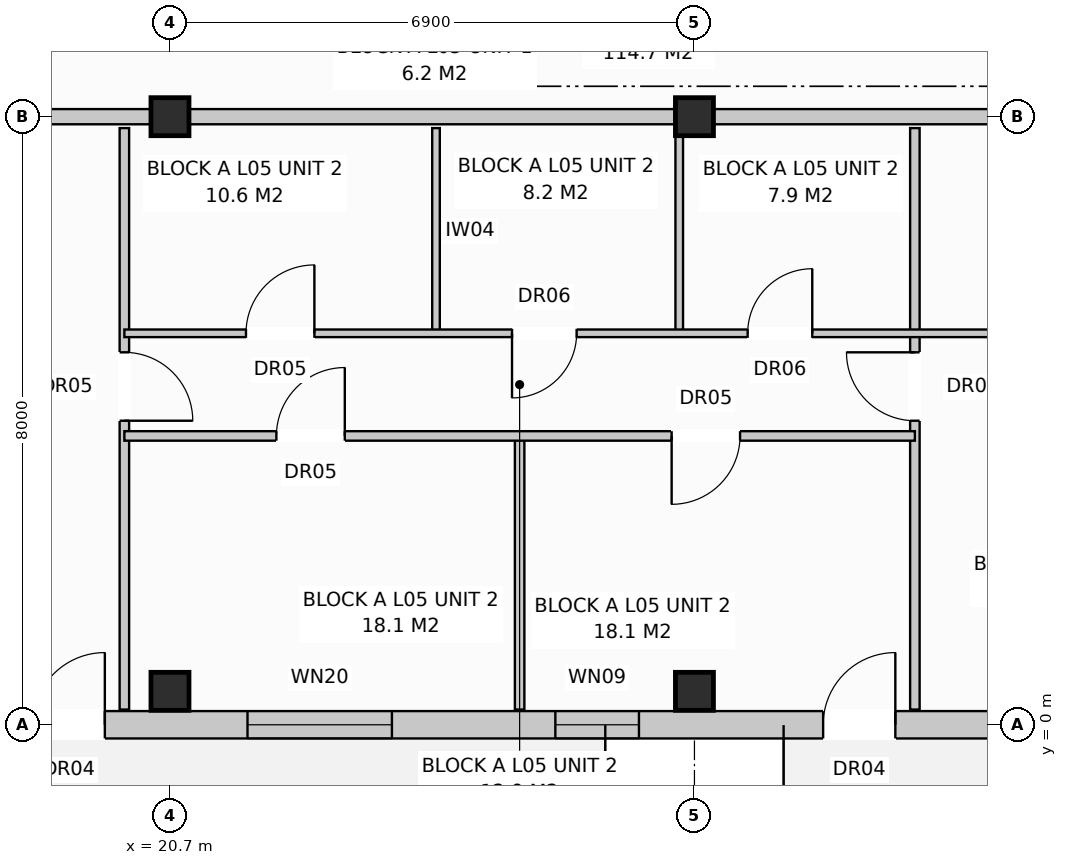
"""IFC4 building model, lengths in metres.
Left out: names, types, materials, properties, quantities, classifications, styles, units other than length and angle.
Written with IfcOpenShell. Run it as: python <this file> out.ifc"""

import sys

from ifc_helpers import new_model, si_unit, direction, frame, frame_2d, origin, origin_with_axes, origin_2d, place, context, subcontext, project, spatial, rectangle, extrude, element, fill, save


model = new_model("IFC4")
c1 = context("Model", 3, precision=1e-05, world=origin(), true_north=direction((0.0, 1.0)))
c2 = subcontext(c1, "Body", "Model", "MODEL_VIEW")
j1 = project(units=[si_unit("LENGTHUNIT", "METRE"), si_unit("PLANEANGLEUNIT", "RADIAN")], contexts=[c1])
p1 = place(None, origin())
s1 = spatial("IfcSite", under=j1, at=p1, CompositionType="ELEMENT")
p2 = place(p1, origin())
s2 = spatial("IfcBuilding", under=s1, at=p2, CompositionType="ELEMENT")
p3 = place(p2, frame((0.0, 0.0, 17.6)))
s3 = spatial("IfcBuildingStorey", under=s2, at=p3, CompositionType="ELEMENT", Elevation=17.6)
for number, where, z_axis, x_axis in (
    (1, (20.7, 0.44, 0.0), (0.0, 0.0, 1.0), (1.0, 0.0, 0.0)),
    (2, (20.7, 8.0, 0.0), (0.0, 0.0, 1.0), (1.0, 0.0, 0.0)),
    (3, (27.6, 0.44, 0.0), (0.0, 0.0, 1.0), (1.0, 0.0, 0.0)),
    (4, (27.6, 8.0, 0.0), (0.0, 0.0, 1.0), (1.0, 0.0, 0.0)),
):
    element("IfcColumn", number, at=place(p3, frame(where, z_axis=z_axis, x_axis=x_axis)), inside=s3, PredefinedType="COLUMN", context=c2, shape_type="SweptSolid", body=[
        extrude(rectangle(XDim=0.5, YDim=0.5, at=origin_2d()), origin(), (0.0, 0.0, 1.0), 3.2),
    ])
p4 = place(p3, frame((0.17, 0.0, 0.0), z_axis=(0.0, 0.0, 1.0), x_axis=(1.0, 0.0, 0.0)))
e5 = element("IfcWall", 5, at=p4, inside=s3, PredefinedType="STANDARD", context=c2, shape_type="SweptSolid", body=[
    extrude(rectangle(XDim=54.86, YDim=0.36, at=frame_2d((27.43, 0.0))), origin(), (0.0, 0.0, 1.0), 2.95),
])
p5 = place(p4, frame((3.823, 0.0, 0.0)))
e6 = element("IfcOpeningElement", 6, at=p5, cuts=e5, PredefinedType="OPENING", context=c2, shape_type="SweptSolid", body=[
    extrude(rectangle(XDim=0.95, YDim=2.1, at=frame_2d((0.475, 1.05))), frame((0.0, 0.192, 0.0), z_axis=(0.0, -1.0, 0.0), x_axis=(1.0, 0.0, 0.0)), (0.0, 0.0, 1.0), 0.384),
])
p6 = place(p4, frame((18.723, 0.0, 0.0)))
e7 = element("IfcOpeningElement", 7, at=p6, cuts=e5, PredefinedType="OPENING", context=c2, shape_type="SweptSolid", body=[
    extrude(rectangle(XDim=0.95, YDim=2.1, at=frame_2d((0.475, 1.05))), frame((0.0, 0.192, 0.0), z_axis=(0.0, -1.0, 0.0), x_axis=(1.0, 0.0, 0.0)), (0.0, 0.0, 1.0), 0.384),
])
p7 = place(p4, frame((29.123, 0.0, 0.0)))
e8 = element("IfcOpeningElement", 8, at=p7, cuts=e5, PredefinedType="OPENING", context=c2, shape_type="SweptSolid", body=[
    extrude(rectangle(XDim=0.95, YDim=2.1, at=frame_2d((0.475, 1.05))), frame((0.0, 0.192, 0.0), z_axis=(0.0, -1.0, 0.0), x_axis=(1.0, 0.0, 0.0)), (0.0, 0.0, 1.0), 0.384),
])
p8 = place(p4, frame((46.5, 0.0, 0.0)))
e9 = element("IfcOpeningElement", 9, at=p8, cuts=e5, PredefinedType="OPENING", context=c2, shape_type="SweptSolid", body=[
    extrude(rectangle(XDim=0.95, YDim=2.1, at=frame_2d((0.475, 1.05))), frame((0.0, 0.192, 0.0), z_axis=(0.0, -1.0, 0.0), x_axis=(1.0, 0.0, 0.0)), (0.0, 0.0, 1.0), 0.384),
])
p9 = place(p4, frame((1.6, 0.0, 0.8)))
e10 = element("IfcOpeningElement", 10, at=p9, cuts=e5, PredefinedType="OPENING", context=c2, shape_type="SweptSolid", body=[
    extrude(rectangle(XDim=1.8, YDim=1.7, at=frame_2d((0.9, 0.85))), frame((0.0, 0.192, 0.0), z_axis=(0.0, -1.0, 0.0), x_axis=(1.0, 0.0, 0.0)), (0.0, 0.0, 1.0), 0.384),
])
p10 = place(p4, frame((7.232, 0.0, 0.72)))
e11 = element("IfcOpeningElement", 11, at=p10, cuts=e5, PredefinedType="OPENING", context=c2, shape_type="SweptSolid", body=[
    extrude(rectangle(XDim=1.9, YDim=1.85, at=frame_2d((0.95, 0.925))), frame((0.0, 0.192, 0.0), z_axis=(0.0, -1.0, 0.0), x_axis=(1.0, 0.0, 0.0)), (0.0, 0.0, 1.0), 0.384),
])
p11 = place(p4, frame((10.425, 0.0, 0.8)))
e12 = element("IfcOpeningElement", 12, at=p11, cuts=e5, PredefinedType="OPENING", context=c2, shape_type="SweptSolid", body=[
    extrude(rectangle(XDim=1.95, YDim=1.65, at=frame_2d((0.975, 0.825))), frame((0.0, 0.192, 0.0), z_axis=(0.0, -1.0, 0.0), x_axis=(1.0, 0.0, 0.0)), (0.0, 0.0, 1.0), 0.384),
])
p12 = place(p4, frame((15.9, 0.0, 0.8)))
e13 = element("IfcOpeningElement", 13, at=p12, cuts=e5, PredefinedType="OPENING", context=c2, shape_type="SweptSolid", body=[
    extrude(rectangle(XDim=1.8, YDim=1.7, at=frame_2d((0.9, 0.85))), frame((0.0, 0.192, 0.0), z_axis=(0.0, -1.0, 0.0), x_axis=(1.0, 0.0, 0.0)), (0.0, 0.0, 1.0), 0.384),
])
p13 = place(p4, frame((21.55, 0.0, 0.72)))
e14 = element("IfcOpeningElement", 14, at=p13, cuts=e5, PredefinedType="OPENING", context=c2, shape_type="SweptSolid", body=[
    extrude(rectangle(XDim=1.9, YDim=1.85, at=frame_2d((0.95, 0.925))), frame((0.0, 0.192, 0.0), z_axis=(0.0, -1.0, 0.0), x_axis=(1.0, 0.0, 0.0)), (0.0, 0.0, 1.0), 0.384),
])
p14 = place(p4, frame((25.6, 0.0, 0.72)))
e15 = element("IfcOpeningElement", 15, at=p14, cuts=e5, PredefinedType="OPENING", context=c2, shape_type="SweptSolid", body=[
    extrude(rectangle(XDim=1.1, YDim=1.5, at=frame_2d((0.55, 0.75))), frame((0.0, 0.192, 0.0), z_axis=(0.0, -1.0, 0.0), x_axis=(1.0, 0.0, 0.0)), (0.0, 0.0, 1.0), 0.384),
])
p15 = place(p4, frame((31.4, 0.0, 0.8)))
e16 = element("IfcOpeningElement", 16, at=p15, cuts=e5, PredefinedType="OPENING", context=c2, shape_type="SweptSolid", body=[
    extrude(rectangle(XDim=1.8, YDim=1.7, at=frame_2d((0.9, 0.85))), frame((0.0, 0.192, 0.0), z_axis=(0.0, -1.0, 0.0), x_axis=(1.0, 0.0, 0.0)), (0.0, 0.0, 1.0), 0.384),
])
p16 = place(p4, frame((35.55, 0.0, 0.72)))
e17 = element("IfcOpeningElement", 17, at=p16, cuts=e5, PredefinedType="OPENING", context=c2, shape_type="SweptSolid", body=[
    extrude(rectangle(XDim=1.9, YDim=1.85, at=frame_2d((0.95, 0.925))), frame((0.0, 0.192, 0.0), z_axis=(0.0, -1.0, 0.0), x_axis=(1.0, 0.0, 0.0)), (0.0, 0.0, 1.0), 0.384),
])
p17 = place(p4, frame((39.25, 0.0, 0.72)))
e18 = element("IfcOpeningElement", 18, at=p17, cuts=e5, PredefinedType="OPENING", context=c2, shape_type="SweptSolid", body=[
    extrude(rectangle(XDim=1.1, YDim=1.5, at=frame_2d((0.55, 0.75))), frame((0.0, 0.192, 0.0), z_axis=(0.0, -1.0, 0.0), x_axis=(1.0, 0.0, 0.0)), (0.0, 0.0, 1.0), 0.384),
])
p18 = place(p4, frame((44.4, 0.0, 0.8)))
e19 = element("IfcOpeningElement", 19, at=p18, cuts=e5, PredefinedType="OPENING", context=c2, shape_type="SweptSolid", body=[
    extrude(rectangle(XDim=1.8, YDim=1.7, at=frame_2d((0.9, 0.85))), frame((0.0, 0.192, 0.0), z_axis=(0.0, -1.0, 0.0), x_axis=(1.0, 0.0, 0.0)), (0.0, 0.0, 1.0), 0.384),
])
p19 = place(p4, frame((49.15, 0.0, 0.72)))
e20 = element("IfcOpeningElement", 20, at=p19, cuts=e5, PredefinedType="OPENING", context=c2, shape_type="SweptSolid", body=[
    extrude(rectangle(XDim=1.9, YDim=1.85, at=frame_2d((0.95, 0.925))), frame((0.0, 0.192, 0.0), z_axis=(0.0, -1.0, 0.0), x_axis=(1.0, 0.0, 0.0)), (0.0, 0.0, 1.0), 0.384),
])
p20 = place(p4, frame((52.95, 0.0, 0.72)))
e21 = element("IfcOpeningElement", 21, at=p20, cuts=e5, PredefinedType="OPENING", context=c2, shape_type="SweptSolid", body=[
    extrude(rectangle(XDim=1.1, YDim=1.5, at=frame_2d((0.55, 0.75))), frame((0.0, 0.192, 0.0), z_axis=(0.0, -1.0, 0.0), x_axis=(1.0, 0.0, 0.0)), (0.0, 0.0, 1.0), 0.384),
])
p21 = place(p3, frame((13.8, 8.0, 0.0), z_axis=(0.0, 0.0, 1.0), x_axis=(1.0, 0.0, 0.0)))
e22 = element("IfcWall", 22, at=p21, inside=s3, PredefinedType="PARTITIONING", context=c2, shape_type="SweptSolid", body=[
    extrude(rectangle(XDim=20.7, YDim=0.2, at=frame_2d((10.35, 0.0))), origin(), (0.0, 0.0, 1.0), 2.39),
])
p22 = place(p21, frame((2.4, 0.0, 0.0)))
e23 = element("IfcOpeningElement", 23, at=p22, cuts=e22, PredefinedType="OPENING", context=c2, shape_type="SweptSolid", body=[
    extrude(rectangle(XDim=0.95, YDim=2.15, at=frame_2d((0.475, 1.075))), frame((0.0, 0.112, 0.0), z_axis=(0.0, -1.0, 0.0), x_axis=(1.0, 0.0, 0.0)), (0.0, 0.0, 1.0), 0.224),
])
p23 = place(p3, frame((20.1, 7.85, 0.0), z_axis=(0.0, 0.0, 1.0), x_axis=(0.0, -1.0, 0.0)))
e24 = element("IfcWall", 24, at=p23, inside=s3, PredefinedType="PARTITIONING", context=c2, shape_type="SweptSolid", body=[
    extrude(rectangle(XDim=7.65, YDim=0.125, at=frame_2d((3.825, 0.0))), origin(), (0.0, 0.0, 1.0), 2.95),
])
p24 = place(p23, frame((2.95, 0.0, 0.0)))
e25 = element("IfcOpeningElement", 25, at=p24, cuts=e24, PredefinedType="OPENING", context=c2, shape_type="SweptSolid", body=[
    extrude(rectangle(XDim=0.9, YDim=2.1, at=frame_2d((0.45, 1.05))), frame((0.0, 0.074, 0.0), z_axis=(0.0, -1.0, 0.0), x_axis=(1.0, 0.0, 0.0)), (0.0, 0.0, 1.0), 0.149),
])
for number, where, z_axis, x_axis in (
    (26, (24.2, 7.85, 0.0), (0.0, 0.0, 1.0), (0.0, -1.0, 0.0)),
    (27, (27.4, 7.85, 0.0), (0.0, 0.0, 1.0), (0.0, -1.0, 0.0)),
):
    element("IfcWall", number, at=place(p3, frame(where, z_axis=z_axis, x_axis=x_axis)), inside=s3, PredefinedType="PARTITIONING", context=c2, shape_type="SweptSolid", body=[
        extrude(rectangle(XDim=2.7, YDim=0.1, at=frame_2d((1.35, 0.0))), origin(), (0.0, 0.0, 1.0), 2.95),
    ])
p25 = place(p3, frame((25.3, 3.8, 0.0), z_axis=(0.0, 0.0, 1.0), x_axis=(0.0, -1.0, 0.0)))
e28 = element("IfcWall", 28, at=p25, inside=s3, PredefinedType="PARTITIONING", context=c2, shape_type="SweptSolid", body=[
    extrude(rectangle(XDim=3.6, YDim=0.125, at=frame_2d((1.8, 0.0))), origin(), (0.0, 0.0, 1.0), 2.95),
])
p26 = place(p3, frame((30.5, 7.85, 0.0), z_axis=(0.0, 0.0, 1.0), x_axis=(0.0, -1.0, 0.0)))
e29 = element("IfcWall", 29, at=p26, inside=s3, PredefinedType="PARTITIONING", context=c2, shape_type="SweptSolid", body=[
    extrude(rectangle(XDim=7.65, YDim=0.125, at=frame_2d((3.825, 0.0))), origin(), (0.0, 0.0, 1.0), 2.95),
])
p27 = place(p26, frame((2.95, 0.0, 0.0)))
e30 = element("IfcOpeningElement", 30, at=p27, cuts=e29, PredefinedType="OPENING", context=c2, shape_type="SweptSolid", body=[
    extrude(rectangle(XDim=0.9, YDim=2.1, at=frame_2d((0.45, 1.05))), frame((0.0, 0.074, 0.0), z_axis=(0.0, -1.0, 0.0), x_axis=(1.0, 0.0, 0.0)), (0.0, 0.0, 1.0), 0.149),
])
p28 = place(p3, frame((20.1, 5.15, 0.0), z_axis=(0.0, 0.0, 1.0), x_axis=(1.0, 0.0, 0.0)))
e31 = element("IfcWall", 31, at=p28, inside=s3, PredefinedType="PARTITIONING", context=c2, shape_type="SweptSolid", body=[
    extrude(rectangle(XDim=14.3, YDim=0.1, at=frame_2d((7.15, 0.0))), origin(), (0.0, 0.0, 1.0), 2.95),
])
p29 = place(p28, frame((1.6, 0.0, 0.0)))
e32 = element("IfcOpeningElement", 32, at=p29, cuts=e31, PredefinedType="OPENING", context=c2, shape_type="SweptSolid", body=[
    extrude(rectangle(XDim=0.9, YDim=2.1, at=frame_2d((0.45, 1.05))), frame((0.0, 0.062, 0.0), z_axis=(0.0, -1.0, 0.0), x_axis=(1.0, 0.0, 0.0)), (0.0, 0.0, 1.0), 0.124),
])
p30 = place(p28, frame((5.1, 0.0, 0.0)))
e33 = element("IfcOpeningElement", 33, at=p30, cuts=e31, PredefinedType="OPENING", context=c2, shape_type="SweptSolid", body=[
    extrude(rectangle(XDim=0.85, YDim=2.05, at=frame_2d((0.425, 1.025))), frame((0.0, 0.062, 0.0), z_axis=(0.0, -1.0, 0.0), x_axis=(1.0, 0.0, 0.0)), (0.0, 0.0, 1.0), 0.124),
])
p31 = place(p28, frame((8.2, 0.0, 0.0)))
e34 = element("IfcOpeningElement", 34, at=p31, cuts=e31, PredefinedType="OPENING", context=c2, shape_type="SweptSolid", body=[
    extrude(rectangle(XDim=0.85, YDim=2.05, at=frame_2d((0.425, 1.025))), frame((0.0, 0.062, 0.0), z_axis=(0.0, -1.0, 0.0), x_axis=(1.0, 0.0, 0.0)), (0.0, 0.0, 1.0), 0.124),
])
p32 = place(p28, frame((11.6, 0.0, 0.0)))
e35 = element("IfcOpeningElement", 35, at=p32, cuts=e31, PredefinedType="OPENING", context=c2, shape_type="SweptSolid", body=[
    extrude(rectangle(XDim=0.85, YDim=2.05, at=frame_2d((0.425, 1.025))), frame((0.0, 0.062, 0.0), z_axis=(0.0, -1.0, 0.0), x_axis=(1.0, 0.0, 0.0)), (0.0, 0.0, 1.0), 0.124),
])
p33 = place(p3, frame((20.1, 3.8, 0.0), z_axis=(0.0, 0.0, 1.0), x_axis=(1.0, 0.0, 0.0)))
e36 = element("IfcWall", 36, at=p33, inside=s3, PredefinedType="PARTITIONING", context=c2, shape_type="SweptSolid", body=[
    extrude(rectangle(XDim=10.4, YDim=0.125, at=frame_2d((5.2, 0.0))), origin(), (0.0, 0.0, 1.0), 2.95),
])
p34 = place(p33, frame((2.0, 0.0, 0.0)))
e37 = element("IfcOpeningElement", 37, at=p34, cuts=e36, PredefinedType="OPENING", context=c2, shape_type="SweptSolid", body=[
    extrude(rectangle(XDim=0.9, YDim=2.1, at=frame_2d((0.45, 1.05))), frame((0.0, 0.074, 0.0), z_axis=(0.0, -1.0, 0.0), x_axis=(1.0, 0.0, 0.0)), (0.0, 0.0, 1.0), 0.149),
])
p35 = place(p33, frame((7.2, 0.0, 0.0)))
e38 = element("IfcOpeningElement", 38, at=p35, cuts=e36, PredefinedType="OPENING", context=c2, shape_type="SweptSolid", body=[
    extrude(rectangle(XDim=0.9, YDim=2.1, at=frame_2d((0.45, 1.05))), frame((0.0, 0.074, 0.0), z_axis=(0.0, -1.0, 0.0), x_axis=(1.0, 0.0, 0.0)), (0.0, 0.0, 1.0), 0.149),
])
p36 = place(p6, origin_with_axes())
e39 = element("IfcDoor", 39, at=p36, inside=s3, OperationType="SINGLE_SWING_RIGHT", PredefinedType="DOOR", context=c2, shape_type="SweptSolid", body=[
    extrude(rectangle(XDim=0.95, YDim=2.1, at=frame_2d((0.475, 1.05))), frame((0.0, 0.025, 0.0), z_axis=(0.0, -1.0, 0.0), x_axis=(1.0, 0.0, 0.0)), (0.0, 0.0, 1.0), 0.05),
])
fill(e7, e39)
p37 = place(p7, origin_with_axes())
e40 = element("IfcDoor", 40, at=p37, inside=s3, OperationType="SINGLE_SWING_RIGHT", PredefinedType="DOOR", context=c2, shape_type="SweptSolid", body=[
    extrude(rectangle(XDim=0.95, YDim=2.1, at=frame_2d((0.475, 1.05))), frame((0.0, 0.025, 0.0), z_axis=(0.0, -1.0, 0.0), x_axis=(1.0, 0.0, 0.0)), (0.0, 0.0, 1.0), 0.05),
])
fill(e8, e40)
p38 = place(p13, origin_with_axes())
e41 = element("IfcWindow", 41, at=p38, inside=s3, PartitioningType="SINGLE_PANEL", PredefinedType="WINDOW", context=c2, shape_type="SweptSolid", body=[
    extrude(rectangle(XDim=1.9, YDim=1.85, at=frame_2d((0.95, 0.925))), frame((0.0, 0.03, 0.0), z_axis=(0.0, -1.0, 0.0), x_axis=(1.0, 0.0, 0.0)), (0.0, 0.0, 1.0), 0.06),
])
fill(e14, e41)
p39 = place(p14, origin_with_axes())
e42 = element("IfcWindow", 42, at=p39, inside=s3, PartitioningType="SINGLE_PANEL", PredefinedType="WINDOW", context=c2, shape_type="SweptSolid", body=[
    extrude(rectangle(XDim=1.1, YDim=1.5, at=frame_2d((0.55, 0.75))), frame((0.0, 0.03, 0.0), z_axis=(0.0, -1.0, 0.0), x_axis=(1.0, 0.0, 0.0)), (0.0, 0.0, 1.0), 0.06),
])
fill(e15, e42)
p40 = place(p24, origin_with_axes())
e43 = element("IfcDoor", 43, at=p40, inside=s3, OperationType="SINGLE_SWING_RIGHT", PredefinedType="DOOR", context=c2, shape_type="SweptSolid", body=[
    extrude(rectangle(XDim=0.9, YDim=2.1, at=frame_2d((0.45, 1.05))), frame((0.0, 0.025, 0.0), z_axis=(0.0, -1.0, 0.0), x_axis=(1.0, 0.0, 0.0)), (0.0, 0.0, 1.0), 0.05),
])
fill(e25, e43)
p41 = place(p27, frame((0.9, 0.0, 0.0), z_axis=(0.0, 0.0, 1.0), x_axis=(-1.0, 0.0, 0.0)))
e44 = element("IfcDoor", 44, at=p41, inside=s3, OperationType="SINGLE_SWING_LEFT", PredefinedType="DOOR", context=c2, shape_type="SweptSolid", body=[
    extrude(rectangle(XDim=0.9, YDim=2.1, at=frame_2d((0.45, 1.05))), frame((0.0, 0.025, 0.0), z_axis=(0.0, -1.0, 0.0), x_axis=(1.0, 0.0, 0.0)), (0.0, 0.0, 1.0), 0.05),
])
fill(e30, e44)
p42 = place(p29, origin_with_axes())
e45 = element("IfcDoor", 45, at=p42, inside=s3, OperationType="SINGLE_SWING_RIGHT", PredefinedType="DOOR", context=c2, shape_type="SweptSolid", body=[
    extrude(rectangle(XDim=0.9, YDim=2.1, at=frame_2d((0.45, 1.05))), frame((0.0, 0.025, 0.0), z_axis=(0.0, -1.0, 0.0), x_axis=(1.0, 0.0, 0.0)), (0.0, 0.0, 1.0), 0.05),
])
fill(e32, e45)
p43 = place(p30, frame((0.85, 0.0, 0.0), z_axis=(0.0, 0.0, 1.0), x_axis=(-1.0, 0.0, 0.0)))
e46 = element("IfcDoor", 46, at=p43, inside=s3, OperationType="SINGLE_SWING_LEFT", PredefinedType="DOOR", context=c2, shape_type="SweptSolid", body=[
    extrude(rectangle(XDim=0.85, YDim=2.05, at=frame_2d((0.425, 1.025))), frame((0.0, 0.025, 0.0), z_axis=(0.0, -1.0, 0.0), x_axis=(1.0, 0.0, 0.0)), (0.0, 0.0, 1.0), 0.05),
])
fill(e33, e46)
p44 = place(p31, origin_with_axes())
e47 = element("IfcDoor", 47, at=p44, inside=s3, OperationType="SINGLE_SWING_RIGHT", PredefinedType="DOOR", context=c2, shape_type="SweptSolid", body=[
    extrude(rectangle(XDim=0.85, YDim=2.05, at=frame_2d((0.425, 1.025))), frame((0.0, 0.025, 0.0), z_axis=(0.0, -1.0, 0.0), x_axis=(1.0, 0.0, 0.0)), (0.0, 0.0, 1.0), 0.05),
])
fill(e34, e47)
p45 = place(p34, origin_with_axes())
e48 = element("IfcDoor", 48, at=p45, inside=s3, OperationType="SINGLE_SWING_RIGHT", PredefinedType="DOOR", context=c2, shape_type="SweptSolid", body=[
    extrude(rectangle(XDim=0.9, YDim=2.1, at=frame_2d((0.45, 1.05))), frame((0.0, 0.025, 0.0), z_axis=(0.0, -1.0, 0.0), x_axis=(1.0, 0.0, 0.0)), (0.0, 0.0, 1.0), 0.05),
])
fill(e37, e48)
p46 = place(p35, frame((0.9, 0.0, 0.0), z_axis=(0.0, 0.0, 1.0), x_axis=(-1.0, 0.0, 0.0)))
e49 = element("IfcDoor", 49, at=p46, inside=s3, OperationType="SINGLE_SWING_LEFT", PredefinedType="DOOR", context=c2, shape_type="SweptSolid", body=[
    extrude(rectangle(XDim=0.9, YDim=2.1, at=frame_2d((0.45, 1.05))), frame((0.0, 0.025, 0.0), z_axis=(0.0, -1.0, 0.0), x_axis=(1.0, 0.0, 0.0)), (0.0, 0.0, 1.0), 0.05),
])
fill(e38, e49)
save(model, sys.argv[1])
